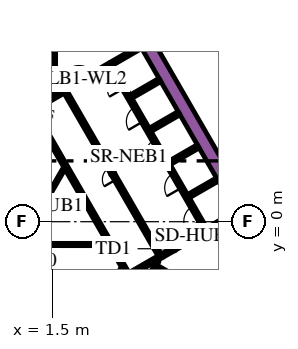
"""IFC4 building model, lengths in metres.
Left out: names, types, materials, properties, quantities, classifications, styles, units other than length and angle.
Written with IfcOpenShell. Run it as: python <this file> out.ifc"""

import sys

from ifc_helpers import new_model, si_unit, direction, frame, frame_2d, origin, place, context, subcontext, project, spatial, polyline, rectangle, outline, extrude, element, fill, save


model = new_model("IFC4")
c1 = context("Model", 3, precision=1e-05, world=origin(), true_north=direction((0.0, 1.0)))
c2 = subcontext(c1, "Body", "Model", "MODEL_VIEW")
j1 = project(units=[si_unit("LENGTHUNIT", "METRE"), si_unit("PLANEANGLEUNIT", "RADIAN")], contexts=[c1])
p1 = place(None, origin())
s1 = spatial("IfcSite", under=j1, at=p1, CompositionType="ELEMENT")
p2 = place(p1, origin())
s2 = spatial("IfcBuilding", under=s1, at=p2, CompositionType="ELEMENT")
p3 = place(p2, frame((0.0, 0.0, 21.6)))
s3 = spatial("IfcBuildingStorey", under=s2, at=p3, CompositionType="ELEMENT", Elevation=21.6)
p4 = place(p3, frame((6.776, 13.364, 0.0), z_axis=(0.0, 0.0, 1.0), x_axis=(0.500004177138, -0.8660229921, 0.0)))
e1 = element("IfcWall", 1, at=p4, inside=s3, PredefinedType="SOLIDWALL", context=c2, shape_type="SweptSolid", body=[
    extrude(rectangle(XDim=20.204, YDim=0.9, at=frame_2d((10.102, 0.0))), origin(), (0.0, 0.0, 1.0), 6.0),
])
p5 = place(p3, frame((8.334, -2.964, 0.0), z_axis=(0.0, 0.0, 1.0), x_axis=(0.866016039709, -0.500016218704, 0.0)))
e2 = element("IfcWall", 2, at=p5, inside=s3, PredefinedType="SOLIDWALL", context=c2, shape_type="SweptSolid", body=[
    extrude(rectangle(XDim=7.05, YDim=0.25, at=frame_2d((3.525, 0.0))), origin(), (0.0, 0.0, 1.0), 6.0),
])
p6 = place(p3, frame((8.168, -3.503, 0.0), z_axis=(0.0, 0.0, 1.0), x_axis=(0.49972245349, 0.866185586049, 0.0)))
e3 = element("IfcWall", 3, at=p6, inside=s3, PredefinedType="SOLIDWALL", context=c2, shape_type="SweptSolid", body=[
    extrude(rectangle(XDim=0.425, YDim=0.25, at=frame_2d((0.212, 0.0))), origin(), (0.0, 0.0, 1.0), 6.0),
])
p7 = place(p3, frame((1.6, 8.95, 0.0), z_axis=(0.0, 0.0, 1.0), x_axis=(0.0, 1.0, 0.0)))
e4 = element("IfcWall", 4, at=p7, inside=s3, PredefinedType="SOLIDWALL", context=c2, shape_type="SweptSolid", body=[
    extrude(rectangle(XDim=6.8, YDim=0.25, at=frame_2d((3.4, 0.0))), origin(), (0.0, 0.0, 1.0), 6.0),
])
p8 = place(p3, frame((1.05, 8.825, 0.0), z_axis=(0.0, 0.0, 1.0), x_axis=(1.0, 0.0, 0.0)))
e5 = element("IfcWall", 5, at=p8, inside=s3, PredefinedType="SOLIDWALL", context=c2, shape_type="SweptSolid", body=[
    extrude(rectangle(XDim=0.675, YDim=0.25, at=frame_2d((0.337, 0.0))), origin(), (0.0, 0.0, 1.0), 6.0),
])
p9 = place(p3, frame((10.464, 1.677, 0.0), z_axis=(0.0, 0.0, 1.0), x_axis=(0.86605622881, 0.499946605688, 0.0)))
e6 = element("IfcWall", 6, at=p9, inside=s3, PredefinedType="SOLIDWALL", context=c2, shape_type="SweptSolid", body=[
    extrude(rectangle(XDim=2.2, YDim=0.25, at=frame_2d((1.1, 0.0))), origin(), (0.0, 0.0, 1.0), 6.0),
])
p10 = place(p3, frame((13.629, 0.594, 0.0), z_axis=(0.0, 0.0, 1.0), x_axis=(-0.866063384774, -0.499934209226, 0.0)))
e7 = element("IfcWall", 7, at=p10, inside=s3, PredefinedType="SOLIDWALL", context=c2, shape_type="SweptSolid", body=[
    extrude(rectangle(XDim=2.428, YDim=0.25, at=frame_2d((1.214, 0.0))), origin(), (0.0, 0.0, 1.0), 6.0),
])
p11 = place(p3, origin())
e8 = element("IfcWall", 8, at=p11, inside=s3, PredefinedType="SOLIDWALL", context=c2, shape_type="SweptSolid", body=[
    extrude(outline(polyline([(0.566, 6.725), (0.566, 6.875), (0.566, 6.875), (0.565, 6.875), (0.361, 6.875), (0.035, 7.439), (0.252, 7.564), (0.377, 7.348), (6.552, -3.348), (6.677, -3.564), (6.46, -3.689), (0.448, 6.725), (0.565, 6.725), (0.566, 6.725), (0.566, 6.725)])), origin(), (0.0, 0.0, 1.0), 6.0),
])
p12 = place(p3, frame((4.358, 9.791, 0.0), z_axis=(0.0, 0.0, 1.0), x_axis=(0.866079547155, 0.499906209203, 0.0)))
e9 = element("IfcWall", 9, at=p12, inside=s3, PredefinedType="SOLIDWALL", context=c2, shape_type="SweptSolid", body=[
    extrude(rectangle(XDim=1.15, YDim=0.25, at=frame_2d((0.575, 0.0))), origin(), (0.0, 0.0, 1.0), 6.0),
])
p13 = place(p3, frame((5.356, 10.367, 0.0), z_axis=(0.0, 0.0, 1.0), x_axis=(0.865978535641, 0.50008116922, 0.0)))
e10 = element("IfcWall", 10, at=p13, inside=s3, PredefinedType="SOLIDWALL", context=c2, shape_type="SweptSolid", body=[
    extrude(rectangle(XDim=2.278, YDim=0.25, at=frame_2d((1.139, 0.0))), origin(), (0.0, 0.0, 1.0), 6.0),
])
p14 = place(p3, frame((0.314, 7.456, 0.0), z_axis=(0.0, 0.0, 1.0), x_axis=(0.866013897511, 0.50001992892, 0.0)))
e11 = element("IfcWall", 11, at=p14, inside=s3, PredefinedType="SOLIDWALL", context=c2, shape_type="SweptSolid", body=[
    extrude(rectangle(XDim=3.268, YDim=0.25, at=frame_2d((1.634, 0.0))), origin(), (0.0, 0.0, 1.0), 6.0),
])
p15 = place(p3, frame((6.614, -3.456, 0.0), z_axis=(0.0, 0.0, 1.0), x_axis=(0.866031582473, 0.499989298045, 0.0)))
e12 = element("IfcWall", 12, at=p15, inside=s3, PredefinedType="SOLIDWALL", context=c2, shape_type="SweptSolid", body=[
    extrude(rectangle(XDim=2.455, YDim=0.25, at=frame_2d((1.228, 0.0))), origin(), (0.0, 0.0, 1.0), 6.0),
])
for number, where, z_axis, x_axis in (
    (13, (6.684, 8.224, 0.0), (0.0, 0.0, 1.0), (0.866, 0.5, 0.0)),
    (14, (7.944, 6.041, 0.0), (0.0, 0.0, 1.0), (0.866, 0.5, 0.0)),
    (15, (9.204, 3.859, 0.0), (0.0, 0.0, 1.0), (0.866, 0.5, 0.0)),
):
    element("IfcWall", number, at=place(p3, frame(where, z_axis=z_axis, x_axis=x_axis)), inside=s3, PredefinedType="SOLIDWALL", context=c2, shape_type="SweptSolid", body=[
        extrude(rectangle(XDim=2.2, YDim=0.25, at=frame_2d((1.1, 0.0))), origin(), (0.0, 0.0, 1.0), 6.0),
    ])
p16 = place(p3, frame((5.705, -3.718, 0.0), z_axis=(0.0, 0.0, 1.0), x_axis=(0.499962090823, 0.866047289552, 0.0)))
e16 = element("IfcWall", 16, at=p16, inside=s3, PredefinedType="PARTITIONING", context=c2, shape_type="SweptSolid", body=[
    extrude(rectangle(XDim=0.735, YDim=0.15, at=frame_2d((0.367, 0.0))), origin(), (0.0, 0.0, 1.0), 4.85),
])
p17 = place(p3, frame((8.459, -2.599, 0.0), z_axis=(0.0, 0.0, 1.0), x_axis=(-0.500041054325, -0.866001699761, 0.0)))
e17 = element("IfcWall", 17, at=p17, inside=s3, PredefinedType="PARTITIONING", context=c2, shape_type="SweptSolid", body=[
    extrude(rectangle(XDim=0.929, YDim=0.15, at=frame_2d((0.464, 0.0))), origin(), (0.0, 0.0, 1.0), 6.0),
])
p18 = place(p3, frame((10.362, -1.5, 0.0), z_axis=(0.0, 0.0, 1.0), x_axis=(1.0, 0.0, 0.0)))
e18 = element("IfcWall", 18, at=p18, inside=s3, PredefinedType="PARTITIONING", context=c2, shape_type="SweptSolid", body=[
    extrude(rectangle(XDim=4.439, YDim=0.15, at=frame_2d((2.22, 0.0))), origin(), (0.0, 0.0, 1.0), 4.85),
])
p19 = place(p3, frame((-4.2, -1.5, 0.0), z_axis=(0.0, 0.0, 1.0), x_axis=(1.0, 0.0, 0.0)))
e19 = element("IfcWall", 19, at=p19, inside=s3, PredefinedType="PARTITIONING", context=c2, shape_type="SweptSolid", body=[
    extrude(rectangle(XDim=9.359, YDim=0.15, at=frame_2d((4.68, 0.0))), origin(), (0.0, 0.0, 1.0), 4.85),
])
p20 = place(p3, frame((1.312, 1.822, 0.0), z_axis=(0.0, 0.0, 1.0), x_axis=(0.500003549559, 0.866023354436, 0.0)))
e20 = element("IfcWall", 20, at=p20, inside=s3, PredefinedType="PARTITIONING", context=c2, shape_type="SweptSolid", body=[
    extrude(rectangle(XDim=1.93, YDim=0.15, at=frame_2d((0.965, 0.0))), origin(), (0.0, 0.0, 1.0), 4.85),
])
p21 = place(p3, frame((1.05, 8.625, 0.0), z_axis=(0.0, 0.0, 1.0), x_axis=(1.0, 0.0, 0.0)))
e21 = element("IfcWall", 21, at=p21, inside=s3, PredefinedType="PARTITIONING", context=c2, shape_type="SweptSolid", body=[
    extrude(rectangle(XDim=0.514, YDim=0.15, at=frame_2d((0.257, 0.0))), origin(), (0.0, 0.0, 1.0), 4.85),
])
p22 = place(p3, frame((11.553, -0.46, 0.0), z_axis=(0.0, 0.0, 1.0), x_axis=(-0.500006514828, 0.866021642414, 0.0)))
e22 = element("IfcWall", 22, at=p22, inside=s3, PredefinedType="SOLIDWALL", context=c2, shape_type="SweptSolid", body=[
    extrude(rectangle(XDim=12.35, YDim=0.25, at=frame_2d((6.175, 0.0))), origin(), (0.0, 0.0, 1.0), 6.0),
])
p23 = place(p22, frame((0.585, 0.0, 0.0)))
e23 = element("IfcOpeningElement", 23, at=p23, cuts=e22, PredefinedType="OPENING", context=c2, shape_type="SweptSolid", body=[
    extrude(rectangle(XDim=1.1, YDim=2.1, at=frame_2d((0.55, 1.05))), frame((0.0, 0.135, 0.0), z_axis=(0.0, -1.0, 0.0), x_axis=(1.0, 0.0, 0.0)), (0.0, 0.0, 1.0), 0.27),
])
p24 = place(p22, frame((3.105, 0.0, 0.0)))
e24 = element("IfcOpeningElement", 24, at=p24, cuts=e22, PredefinedType="OPENING", context=c2, shape_type="SweptSolid", body=[
    extrude(rectangle(XDim=1.1, YDim=2.1, at=frame_2d((0.55, 1.05))), frame((0.0, 0.135, 0.0), z_axis=(0.0, -1.0, 0.0), x_axis=(1.0, 0.0, 0.0)), (0.0, 0.0, 1.0), 0.27),
])
p25 = place(p22, frame((5.625, 0.0, 0.0)))
e25 = element("IfcOpeningElement", 25, at=p25, cuts=e22, PredefinedType="OPENING", context=c2, shape_type="SweptSolid", body=[
    extrude(rectangle(XDim=1.1, YDim=2.1, at=frame_2d((0.55, 1.05))), frame((0.0, 0.135, 0.0), z_axis=(0.0, -1.0, 0.0), x_axis=(1.0, 0.0, 0.0)), (0.0, 0.0, 1.0), 0.27),
])
p26 = place(p22, frame((8.145, 0.0, 0.0)))
e26 = element("IfcOpeningElement", 26, at=p26, cuts=e22, PredefinedType="OPENING", context=c2, shape_type="SweptSolid", body=[
    extrude(rectangle(XDim=1.1, YDim=2.1, at=frame_2d((0.55, 1.05))), frame((0.0, 0.135, 0.0), z_axis=(0.0, -1.0, 0.0), x_axis=(1.0, 0.0, 0.0)), (0.0, 0.0, 1.0), 0.27),
])
p27 = place(p22, frame((10.665, 0.0, 0.0)))
e27 = element("IfcOpeningElement", 27, at=p27, cuts=e22, PredefinedType="OPENING", context=c2, shape_type="SweptSolid", body=[
    extrude(rectangle(XDim=1.1, YDim=2.1, at=frame_2d((0.55, 1.05))), frame((0.0, 0.135, 0.0), z_axis=(0.0, -1.0, 0.0), x_axis=(1.0, 0.0, 0.0)), (0.0, 0.0, 1.0), 0.27),
])
p28 = place(p3, frame((8.565, -2.185, 0.0), z_axis=(0.0, 0.0, 1.0), x_axis=(-0.499997954832, 0.866026584559, 0.0)))
e28 = element("IfcWall", 28, at=p28, inside=s3, PredefinedType="SOLIDWALL", context=c2, shape_type="SweptSolid", body=[
    extrude(rectangle(XDim=12.35, YDim=0.25, at=frame_2d((6.175, 0.0))), origin(), (0.0, 0.0, 1.0), 6.0),
])
p29 = place(p28, frame((5.725, 0.0, 0.0)))
e29 = element("IfcOpeningElement", 29, at=p29, cuts=e28, PredefinedType="OPENING", context=c2, shape_type="SweptSolid", body=[
    extrude(rectangle(XDim=0.9, YDim=2.1, at=frame_2d((0.45, 1.05))), frame((0.0, 0.135, 0.0), z_axis=(0.0, -1.0, 0.0), x_axis=(1.0, 0.0, 0.0)), (0.0, 0.0, 1.0), 0.27),
])
p30 = place(p3, frame((8.74, -2.229, 0.0), z_axis=(0.0, 0.0, 1.0), x_axis=(0.865989075817, 0.500062916607, 0.0)))
e30 = element("IfcWall", 30, at=p30, inside=s3, PredefinedType="SOLIDWALL", context=c2, shape_type="SweptSolid", body=[
    extrude(rectangle(XDim=1.8, YDim=0.25, at=frame_2d((0.9, 0.0))), origin(), (0.0, 0.0, 1.0), 6.0),
])
p31 = place(p30, frame((0.45, 0.0, 0.0)))
e31 = element("IfcOpeningElement", 31, at=p31, cuts=e30, PredefinedType="OPENING", context=c2, shape_type="SweptSolid", body=[
    extrude(rectangle(XDim=0.9, YDim=2.1, at=frame_2d((0.45, 1.05))), frame((0.0, 0.135, 0.0), z_axis=(0.0, -1.0, 0.0), x_axis=(1.0, 0.0, 0.0)), (0.0, 0.0, 1.0), 0.27),
])
p32 = place(p3, frame((3.183, 9.02, 0.0), z_axis=(0.0, 0.0, 1.0), x_axis=(0.866034573852, 0.49998411664, 0.0)))
e32 = element("IfcWall", 32, at=p32, inside=s3, PredefinedType="PARTITIONING", context=c2, shape_type="SweptSolid", body=[
    extrude(rectangle(XDim=1.4, YDim=0.09, at=frame_2d((0.7, 0.0))), origin(), (0.0, 0.0, 1.0), 4.85),
])
p33 = place(p32, frame((0.1, 0.0, 0.0)))
e33 = element("IfcOpeningElement", 33, at=p33, cuts=e32, PredefinedType="OPENING", context=c2, shape_type="SweptSolid", body=[
    extrude(rectangle(XDim=1.2, YDim=2.1, at=frame_2d((0.6, 1.05))), frame((0.0, 0.055, 0.0), z_axis=(0.0, -1.0, 0.0), x_axis=(1.0, 0.0, 0.0)), (0.0, 0.0, 1.0), 0.11),
])
p34 = place(p3, frame((10.313, -1.32, 0.0), z_axis=(0.0, 0.0, 1.0), x_axis=(0.866034573852, 0.49998411664, 0.0)))
e34 = element("IfcWall", 34, at=p34, inside=s3, PredefinedType="SOLIDWALL", context=c2, shape_type="SweptSolid", body=[
    extrude(rectangle(XDim=1.4, YDim=0.25, at=frame_2d((0.7, 0.0))), origin(), (0.0, 0.0, 1.0), 6.0),
])
p35 = place(p34, frame((0.25, 0.0, 0.0)))
e35 = element("IfcOpeningElement", 35, at=p35, cuts=e34, PredefinedType="OPENING", context=c2, shape_type="SweptSolid", body=[
    extrude(rectangle(XDim=0.9, YDim=2.1, at=frame_2d((0.45, 1.05))), frame((0.0, 0.135, 0.0), z_axis=(0.0, -1.0, 0.0), x_axis=(1.0, 0.0, 0.0)), (0.0, 0.0, 1.0), 0.27),
])
p36 = place(p3, frame((38.25, -14.145, 0.0), z_axis=(0.0, 0.0, 1.0), x_axis=(-0.500000527961, 0.866025098966, 0.0)))
e36 = element("IfcWall", 36, at=p36, inside=s3, PredefinedType="SOLIDWALL", context=c2, shape_type="SweptSolid", body=[
    extrude(rectangle(XDim=62.75, YDim=0.25, at=frame_2d((31.375, 0.0))), origin(), (0.0, 0.0, 1.0), 4.5),
])
p37 = place(p23, origin())
e37 = element("IfcDoor", 37, at=p37, inside=s3, OperationType="DOUBLE_DOOR_SLIDING", PredefinedType="DOOR", context=c2, shape_type="SweptSolid", body=[
    extrude(rectangle(XDim=1.1, YDim=2.1, at=frame_2d((0.55, 1.05))), frame((0.0, 0.025, 0.0), z_axis=(0.0, -1.0, 0.0), x_axis=(1.0, 0.0, 0.0)), (0.0, 0.0, 1.0), 0.05),
])
fill(e23, e37)
p38 = place(p24, origin())
e38 = element("IfcDoor", 38, at=p38, inside=s3, OperationType="DOUBLE_DOOR_SLIDING", PredefinedType="DOOR", context=c2, shape_type="SweptSolid", body=[
    extrude(rectangle(XDim=1.1, YDim=2.1, at=frame_2d((0.55, 1.05))), frame((0.0, 0.025, 0.0), z_axis=(0.0, -1.0, 0.0), x_axis=(1.0, 0.0, 0.0)), (0.0, 0.0, 1.0), 0.05),
])
fill(e24, e38)
p39 = place(p25, origin())
e39 = element("IfcDoor", 39, at=p39, inside=s3, OperationType="DOUBLE_DOOR_SLIDING", PredefinedType="DOOR", context=c2, shape_type="SweptSolid", body=[
    extrude(rectangle(XDim=1.1, YDim=2.1, at=frame_2d((0.55, 1.05))), frame((0.0, 0.025, 0.0), z_axis=(0.0, -1.0, 0.0), x_axis=(1.0, 0.0, 0.0)), (0.0, 0.0, 1.0), 0.05),
])
fill(e25, e39)
p40 = place(p26, origin())
e40 = element("IfcDoor", 40, at=p40, inside=s3, OperationType="DOUBLE_DOOR_SLIDING", PredefinedType="DOOR", context=c2, shape_type="SweptSolid", body=[
    extrude(rectangle(XDim=1.1, YDim=2.1, at=frame_2d((0.55, 1.05))), frame((0.0, 0.025, 0.0), z_axis=(0.0, -1.0, 0.0), x_axis=(1.0, 0.0, 0.0)), (0.0, 0.0, 1.0), 0.05),
])
fill(e26, e40)
p41 = place(p27, origin())
e41 = element("IfcDoor", 41, at=p41, inside=s3, OperationType="DOUBLE_DOOR_SLIDING", PredefinedType="DOOR", context=c2, shape_type="SweptSolid", body=[
    extrude(rectangle(XDim=1.1, YDim=2.1, at=frame_2d((0.55, 1.05))), frame((0.0, 0.025, 0.0), z_axis=(0.0, -1.0, 0.0), x_axis=(1.0, 0.0, 0.0)), (0.0, 0.0, 1.0), 0.05),
])
fill(e27, e41)
p42 = place(p29, origin())
e42 = element("IfcDoor", 42, at=p42, inside=s3, OperationType="SINGLE_SWING_LEFT", PredefinedType="DOOR", context=c2, shape_type="SweptSolid", body=[
    extrude(rectangle(XDim=0.9, YDim=2.1, at=frame_2d((0.45, 1.05))), frame((0.0, 0.025, 0.0), z_axis=(0.0, -1.0, 0.0), x_axis=(1.0, 0.0, 0.0)), (0.0, 0.0, 1.0), 0.05),
])
fill(e29, e42)
p43 = place(p31, origin())
e43 = element("IfcDoor", 43, at=p43, inside=s3, OperationType="SINGLE_SWING_LEFT", PredefinedType="DOOR", context=c2, shape_type="SweptSolid", body=[
    extrude(rectangle(XDim=0.9, YDim=2.1, at=frame_2d((0.45, 1.05))), frame((0.0, 0.025, 0.0), z_axis=(0.0, -1.0, 0.0), x_axis=(1.0, 0.0, 0.0)), (0.0, 0.0, 1.0), 0.05),
])
fill(e31, e43)
p44 = place(p33, origin())
e44 = element("IfcDoor", 44, at=p44, inside=s3, OperationType="SINGLE_SWING_LEFT", PredefinedType="DOOR", context=c2, shape_type="SweptSolid", body=[
    extrude(rectangle(XDim=1.2, YDim=2.1, at=frame_2d((0.6, 1.05))), frame((0.0, 0.025, 0.0), z_axis=(0.0, -1.0, 0.0), x_axis=(1.0, 0.0, 0.0)), (0.0, 0.0, 1.0), 0.05),
])
fill(e33, e44)
p45 = place(p35, origin())
e45 = element("IfcDoor", 45, at=p45, inside=s3, OperationType="SINGLE_SWING_LEFT", PredefinedType="DOOR", context=c2, shape_type="SweptSolid", body=[
    extrude(rectangle(XDim=0.9, YDim=2.1, at=frame_2d((0.45, 1.05))), frame((0.0, 0.025, 0.0), z_axis=(0.0, -1.0, 0.0), x_axis=(1.0, 0.0, 0.0)), (0.0, 0.0, 1.0), 0.05),
])
fill(e35, e45)
save(model, sys.argv[1])
